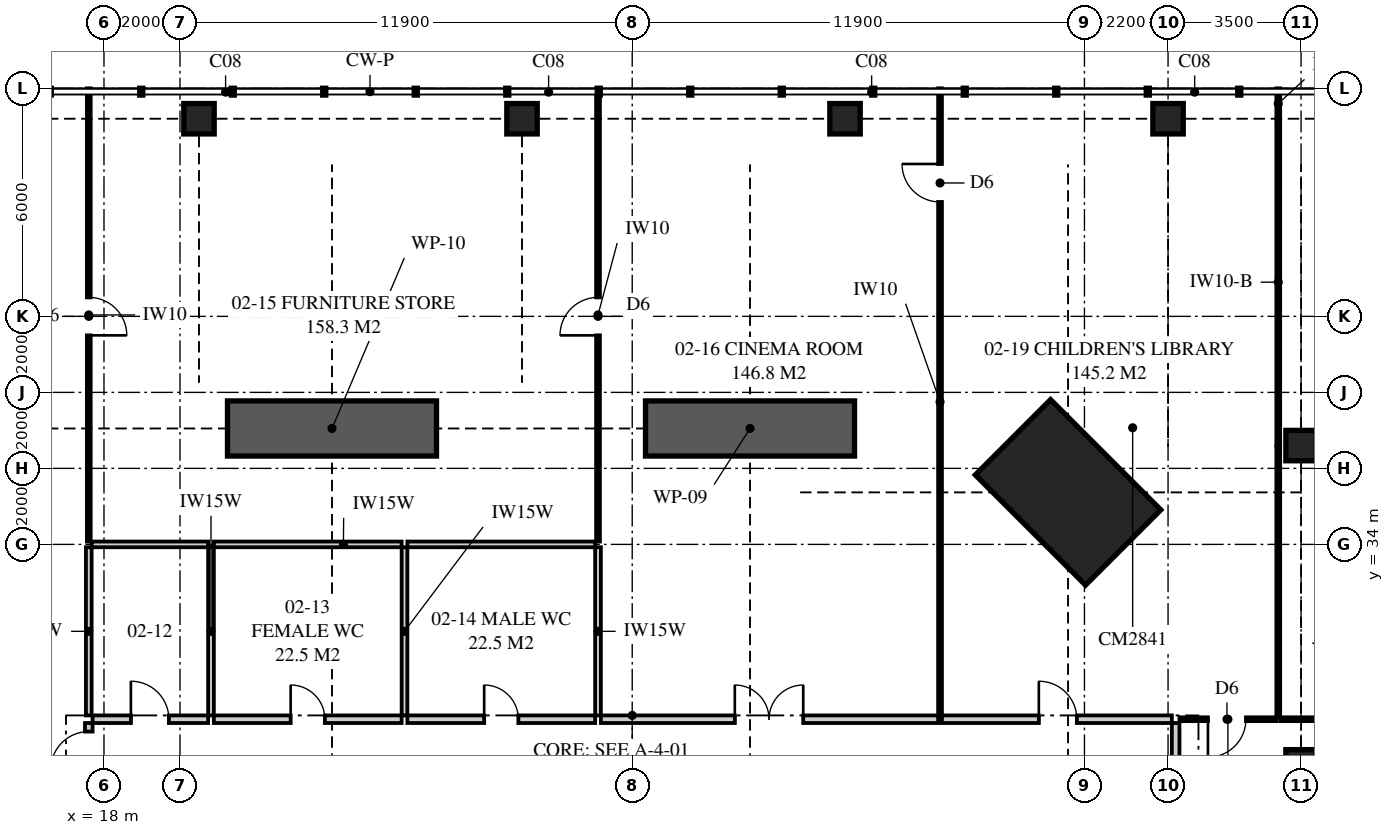
"""IFC4 building model, lengths in metres.
Left out: names, types, materials, properties, quantities, classifications, styles, units other than length and angle.
Written with IfcOpenShell. Run it as: python <this file> out.ifc"""

import sys

from ifc_helpers import new_model, si_unit, direction, frame, frame_2d, origin, origin_2d, place, context, subcontext, project, spatial, polyline, rectangle, outline, extrude, element, fill, save


model = new_model("IFC4")
c1 = context("Model", 3, precision=1e-05, world=origin(), true_north=direction((0.0, 1.0)))
c2 = subcontext(c1, "Body", "Model", "MODEL_VIEW")
j1 = project(units=[si_unit("LENGTHUNIT", "METRE"), si_unit("PLANEANGLEUNIT", "RADIAN")], contexts=[c1])
p1 = place(None, origin())
s1 = spatial("IfcSite", under=j1, at=p1, CompositionType="ELEMENT")
p2 = place(p1, origin())
s2 = spatial("IfcBuilding", under=s1, at=p2, CompositionType="ELEMENT")
p3 = place(p2, frame((0.0, 0.0, 11.0)))
s3 = spatial("IfcBuildingStorey", under=s2, at=p3, CompositionType="ELEMENT", Elevation=11.0)
p4 = place(p3, frame((43.369, 35.369, 0.0), z_axis=(0.0, 0.0, 1.0), x_axis=(-0.707106781187, -0.707106781187, 0.0)))
e1 = element("IfcColumn", 1, at=p4, inside=s3, PredefinedType="COLUMN", context=c2, shape_type="SweptSolid", body=[
    extrude(rectangle(XDim=2.8, YDim=4.1, at=origin_2d()), origin(), (0.0, 0.0, 1.0), 5.0),
])
for number, where, z_axis, x_axis in (
    (2, (49.5, 28.2, 0.0), (0.0, 0.0, 1.0), (1.0, 0.0, 0.0)),
    (3, (49.5, 36.6, 0.0), (0.0, 0.0, 1.0), (1.0, 0.0, 0.0)),
    (4, (20.5, 45.2, 0.0), (0.0, 0.0, 1.0), (1.0, 0.0, 0.0)),
    (5, (29.0, 45.2, 0.0), (0.0, 0.0, 1.0), (1.0, 0.0, 0.0)),
    (6, (37.5, 45.2, 0.0), (0.0, 0.0, 1.0), (1.0, 0.0, 0.0)),
    (7, (46.0, 45.2, 0.0), (0.0, 0.0, 1.0), (1.0, 0.0, 0.0)),
):
    element("IfcColumn", number, at=place(p3, frame(where, z_axis=z_axis, x_axis=x_axis)), inside=s3, PredefinedType="COLUMN", context=c2, shape_type="SweptSolid", body=[
        extrude(rectangle(XDim=0.8, YDim=0.8, at=origin_2d()), origin(), (0.0, 0.0, 1.0), 5.0),
    ])
p5 = place(p3, frame((17.6, 27.75, 0.0), z_axis=(0.0, 0.0, 1.0), x_axis=(0.0, 1.0, 0.0)))
e8 = element("IfcWall", 8, at=p5, inside=s3, PredefinedType="PARTITIONING", context=c2, shape_type="SweptSolid", body=[
    extrude(rectangle(XDim=1.55, YDim=0.2, at=frame_2d((0.775, 0.0))), origin(), (0.0, 0.0, 1.0), 4.72),
])
p6 = place(p5, frame((0.325, 0.0, 0.0)))
e9 = element("IfcOpeningElement", 9, at=p6, cuts=e8, PredefinedType="OPENING", context=c2, shape_type="SweptSolid", body=[
    extrude(rectangle(XDim=1.0, YDim=2.1, at=frame_2d((0.5, 1.05))), frame((0.0, 0.11, 0.0), z_axis=(0.0, -1.0, 0.0), x_axis=(1.0, 0.0, 0.0)), (0.0, 0.0, 1.0), 0.22),
])
p7 = place(p3, frame((17.6, 29.5, 0.0), z_axis=(0.0, 0.0, 1.0), x_axis=(0.0, 1.0, 0.0)))
e10 = element("IfcWall", 10, at=p7, inside=s3, PredefinedType="PLUMBINGWALL", context=c2, shape_type="SweptSolid", body=[
    extrude(rectangle(XDim=4.425, YDim=0.15, at=frame_2d((2.212, 0.0))), origin(), (0.0, 0.0, 1.0), 4.72),
])
p8 = place(p3, frame((17.6, 34.075, 0.0), z_axis=(0.0, 0.0, 1.0), x_axis=(0.0, 1.0, 0.0)))
e11 = element("IfcWall", 11, at=p8, inside=s3, PredefinedType="PARTITIONING", context=c2, shape_type="SweptSolid", body=[
    extrude(outline(polyline([(0.0, 0.0), (11.925, 0.0), (11.925, 4.72), (11.925, 4.02), (9.865, 4.02), (9.865, 4.72), (4.235, 4.72), (4.235, 4.02), (1.715, 4.02), (1.715, 4.72), (0.0, 4.72), (0.0, 0.0)])), frame((0.0, 0.05, 0.0), z_axis=(0.0, -1.0, 0.0), x_axis=(1.0, 0.0, 0.0)), (0.0, 0.0, 1.0), 0.1),
])
p9 = place(p8, frame((5.425, 0.0, 0.0)))
e12 = element("IfcOpeningElement", 12, at=p9, cuts=e11, PredefinedType="OPENING", context=c2, shape_type="SweptSolid", body=[
    extrude(rectangle(XDim=1.0, YDim=2.1, at=frame_2d((0.5, 1.05))), frame((0.0, 0.06, 0.0), z_axis=(0.0, -1.0, 0.0), x_axis=(1.0, 0.0, 0.0)), (0.0, 0.0, 1.0), 0.12),
])
p10 = place(p3, frame((17.7, 29.4, 0.0), z_axis=(0.0, 0.0, 1.0), x_axis=(1.0, 0.0, 0.0)))
e13 = element("IfcWall", 13, at=p10, inside=s3, PredefinedType="PARTITIONING", context=c2, shape_type="SweptSolid", body=[
    extrude(rectangle(XDim=3.041, YDim=0.2, at=frame_2d((1.521, 0.0))), origin(), (0.0, 0.0, 1.0), 4.72),
])
p11 = place(p10, frame((1.008, 0.0, 0.0)))
e14 = element("IfcOpeningElement", 14, at=p11, cuts=e13, PredefinedType="OPENING", context=c2, shape_type="SweptSolid", body=[
    extrude(rectangle(XDim=1.0, YDim=2.1, at=frame_2d((0.5, 1.05))), frame((0.0, 0.11, 0.0), z_axis=(0.0, -1.0, 0.0), x_axis=(1.0, 0.0, 0.0)), (0.0, 0.0, 1.0), 0.22),
])
p12 = place(p3, frame((20.891, 29.4, 0.0), z_axis=(0.0, 0.0, 1.0), x_axis=(1.0, 0.0, 0.0)))
e15 = element("IfcWall", 15, at=p12, inside=s3, PredefinedType="PARTITIONING", context=c2, shape_type="SweptSolid", body=[
    extrude(outline(polyline([(0.0, 0.0), (4.942, 0.0), (4.942, 4.72), (4.419, 4.72), (4.419, 4.02), (1.799, 4.02), (1.799, 4.72), (0.0, 4.72), (0.0, 0.0)])), frame((0.0, 0.1, 0.0), z_axis=(0.0, -1.0, 0.0), x_axis=(1.0, 0.0, 0.0)), (0.0, 0.0, 1.0), 0.2),
])
p13 = place(p12, frame((2.021, 0.0, 0.0)))
e16 = element("IfcOpeningElement", 16, at=p13, cuts=e15, PredefinedType="OPENING", context=c2, shape_type="SweptSolid", body=[
    extrude(rectangle(XDim=0.9, YDim=2.1, at=frame_2d((0.45, 1.05))), frame((0.0, 0.11, 0.0), z_axis=(0.0, -1.0, 0.0), x_axis=(1.0, 0.0, 0.0)), (0.0, 0.0, 1.0), 0.22),
])
p14 = place(p3, frame((25.983, 29.4, 0.0), z_axis=(0.0, 0.0, 1.0), x_axis=(1.0, 0.0, 0.0)))
e17 = element("IfcWall", 17, at=p14, inside=s3, PredefinedType="PARTITIONING", context=c2, shape_type="SweptSolid", body=[
    extrude(rectangle(XDim=4.942, YDim=0.2, at=frame_2d((2.471, 0.0))), origin(), (0.0, 0.0, 1.0), 4.72),
])
p15 = place(p14, frame((2.021, 0.0, 0.0)))
e18 = element("IfcOpeningElement", 18, at=p15, cuts=e17, PredefinedType="OPENING", context=c2, shape_type="SweptSolid", body=[
    extrude(rectangle(XDim=0.9, YDim=2.1, at=frame_2d((0.45, 1.05))), frame((0.0, 0.11, 0.0), z_axis=(0.0, -1.0, 0.0), x_axis=(1.0, 0.0, 0.0)), (0.0, 0.0, 1.0), 0.22),
])
p16 = place(p3, frame((31.075, 29.4, 0.0), z_axis=(0.0, 0.0, 1.0), x_axis=(1.0, 0.0, 0.0)))
e19 = element("IfcWall", 19, at=p16, inside=s3, PredefinedType="PARTITIONING", context=c2, shape_type="SweptSolid", body=[
    extrude(outline(polyline([(0.0, 0.0), (8.875, 0.0), (8.875, 4.72), (5.235, 4.72), (5.235, 4.02), (2.615, 4.02), (2.615, 4.72), (0.0, 4.72), (0.0, 0.0)])), frame((0.0, 0.1, 0.0), z_axis=(0.0, -1.0, 0.0), x_axis=(1.0, 0.0, 0.0)), (0.0, 0.0, 1.0), 0.2),
])
p17 = place(p16, frame((3.525, 0.0, 0.0)))
e20 = element("IfcOpeningElement", 20, at=p17, cuts=e19, PredefinedType="OPENING", context=c2, shape_type="SweptSolid", body=[
    extrude(rectangle(XDim=1.8, YDim=2.1, at=frame_2d((0.9, 1.05))), frame((0.0, 0.11, 0.0), z_axis=(0.0, -1.0, 0.0), x_axis=(1.0, 0.0, 0.0)), (0.0, 0.0, 1.0), 0.22),
])
p18 = place(p3, frame((46.2, 27.75, 0.0), z_axis=(0.0, 0.0, 1.0), x_axis=(0.0, 1.0, 0.0)))
e21 = element("IfcWall", 21, at=p18, inside=s3, PredefinedType="PARTITIONING", context=c2, shape_type="SweptSolid", body=[
    extrude(outline(polyline([(0.0, 0.0), (1.55, 0.0), (1.55, 4.72), (1.55, 4.02), (0.0, 4.02), (0.0, 4.72), (0.0, 0.0)])), frame((0.0, 0.1, 0.0), z_axis=(0.0, -1.0, 0.0), x_axis=(1.0, 0.0, 0.0)), (0.0, 0.0, 1.0), 0.2),
])
p19 = place(p3, frame((40.05, 29.4, 0.0), z_axis=(0.0, 0.0, 1.0), x_axis=(1.0, 0.0, 0.0)))
e22 = element("IfcWall", 22, at=p19, inside=s3, PredefinedType="PARTITIONING", context=c2, shape_type="SweptSolid", body=[
    extrude(outline(polyline([(0.0, 0.0), (2.55, 0.0), (2.55, 4.02), (2.009, 4.02), (2.009, 4.72), (0.0, 4.72), (0.0, 0.0)])), frame((0.0, 0.1, 0.0), z_axis=(0.0, -1.0, 0.0), x_axis=(1.0, 0.0, 0.0)), (0.0, 0.0, 1.0), 0.2),
])
p20 = place(p3, frame((42.6, 29.4, 0.0), z_axis=(0.0, 0.0, 1.0), x_axis=(1.0, 0.0, 0.0)))
e23 = element("IfcWall", 23, at=p20, inside=s3, PredefinedType="PARTITIONING", context=c2, shape_type="SweptSolid", body=[
    extrude(rectangle(XDim=3.5, YDim=0.2, at=frame_2d((1.75, 0.0))), origin(), (0.0, 0.0, 1.0), 4.02),
])
p21 = place(p20, origin())
e24 = element("IfcOpeningElement", 24, at=p21, cuts=e23, PredefinedType="OPENING", context=c2, shape_type="SweptSolid", body=[
    extrude(rectangle(XDim=1.0, YDim=2.1, at=frame_2d((0.5, 1.05))), frame((0.0, 0.11, 0.0), z_axis=(0.0, -1.0, 0.0), x_axis=(1.0, 0.0, 0.0)), (0.0, 0.0, 1.0), 0.22),
])
p22 = place(p3, frame((20.816, 29.5, 0.0), z_axis=(0.0, 0.0, 1.0), x_axis=(0.0, 1.0, 0.0)))
e25 = element("IfcWall", 25, at=p22, inside=s3, PredefinedType="PLUMBINGWALL", context=c2, shape_type="SweptSolid", body=[
    extrude(rectangle(XDim=4.425, YDim=0.15, at=frame_2d((2.212, 0.0))), origin(), (0.0, 0.0, 1.0), 4.72),
])
p23 = place(p3, frame((17.675, 34.0, 0.0), z_axis=(0.0, 0.0, 1.0), x_axis=(1.0, 0.0, 0.0)))
e26 = element("IfcWall", 26, at=p23, inside=s3, PredefinedType="PLUMBINGWALL", context=c2, shape_type="SweptSolid", body=[
    extrude(rectangle(XDim=3.066, YDim=0.15, at=frame_2d((1.533, 0.0))), origin(), (0.0, 0.0, 1.0), 4.72),
])
p24 = place(p3, frame((25.908, 29.5, 0.0), z_axis=(0.0, 0.0, 1.0), x_axis=(0.0, 1.0, 0.0)))
e27 = element("IfcWall", 27, at=p24, inside=s3, PredefinedType="PLUMBINGWALL", context=c2, shape_type="SweptSolid", body=[
    extrude(rectangle(XDim=4.425, YDim=0.15, at=frame_2d((2.212, 0.0))), origin(), (0.0, 0.0, 1.0), 4.72),
])
p25 = place(p3, frame((20.891, 34.0, 0.0), z_axis=(0.0, 0.0, 1.0), x_axis=(1.0, 0.0, 0.0)))
e28 = element("IfcWall", 28, at=p25, inside=s3, PredefinedType="PLUMBINGWALL", context=c2, shape_type="SweptSolid", body=[
    extrude(outline(polyline([(0.0, 0.0), (4.942, 0.0), (4.942, 4.72), (4.394, 4.72), (4.394, 4.02), (1.824, 4.02), (1.824, 4.72), (0.0, 4.72), (0.0, 0.0)])), frame((0.0, 0.075, 0.0), z_axis=(0.0, -1.0, 0.0), x_axis=(1.0, 0.0, 0.0)), (0.0, 0.0, 1.0), 0.15),
])
p26 = place(p3, frame((25.983, 34.0, 0.0), z_axis=(0.0, 0.0, 1.0), x_axis=(1.0, 0.0, 0.0)))
e29 = element("IfcWall", 29, at=p26, inside=s3, PredefinedType="PLUMBINGWALL", context=c2, shape_type="SweptSolid", body=[
    extrude(rectangle(XDim=4.942, YDim=0.15, at=frame_2d((2.471, 0.0))), origin(), (0.0, 0.0, 1.0), 4.72),
])
p27 = place(p3, frame((31.0, 29.5, 0.0), z_axis=(0.0, 0.0, 1.0), x_axis=(0.0, 1.0, 0.0)))
e30 = element("IfcWall", 30, at=p27, inside=s3, PredefinedType="PLUMBINGWALL", context=c2, shape_type="SweptSolid", body=[
    extrude(rectangle(XDim=4.425, YDim=0.15, at=frame_2d((2.212, 0.0))), origin(), (0.0, 0.0, 1.0), 4.72),
])
p28 = place(p3, frame((31.0, 34.075, 0.0), z_axis=(0.0, 0.0, 1.0), x_axis=(0.0, 1.0, 0.0)))
e31 = element("IfcWall", 31, at=p28, inside=s3, PredefinedType="PARTITIONING", context=c2, shape_type="SweptSolid", body=[
    extrude(outline(polyline([(0.0, 0.0), (11.925, 0.0), (11.925, 4.72), (11.925, 4.02), (9.865, 4.02), (9.865, 4.72), (4.235, 4.72), (4.235, 4.02), (1.715, 4.02), (1.715, 4.72), (0.0, 4.72), (0.0, 0.0)])), frame((0.0, 0.05, 0.0), z_axis=(0.0, -1.0, 0.0), x_axis=(1.0, 0.0, 0.0)), (0.0, 0.0, 1.0), 0.1),
])
p29 = place(p28, frame((5.425, 0.0, 0.0)))
e32 = element("IfcOpeningElement", 32, at=p29, cuts=e31, PredefinedType="OPENING", context=c2, shape_type="SweptSolid", body=[
    extrude(rectangle(XDim=1.0, YDim=2.1, at=frame_2d((0.5, 1.05))), frame((0.0, 0.06, 0.0), z_axis=(0.0, -1.0, 0.0), x_axis=(1.0, 0.0, 0.0)), (0.0, 0.0, 1.0), 0.12),
])
p30 = place(p3, frame((40.0, 29.5, 0.0), z_axis=(0.0, 0.0, 1.0), x_axis=(0.0, 1.0, 0.0)))
e33 = element("IfcWall", 33, at=p30, inside=s3, PredefinedType="PARTITIONING", context=c2, shape_type="SweptSolid", body=[
    extrude(outline(polyline([(0.0, 0.0), (16.5, 0.0), (16.5, 4.72), (16.5, 4.02), (14.44, 4.02), (14.44, 4.72), (7.129, 4.72), (7.129, 4.02), (4.609, 4.02), (4.609, 4.72), (0.0, 4.72), (0.0, 0.0)])), frame((0.0, 0.05, 0.0), z_axis=(0.0, -1.0, 0.0), x_axis=(1.0, 0.0, 0.0)), (0.0, 0.0, 1.0), 0.1),
])
p31 = place(p30, frame((13.51, 0.0, 0.0)))
e34 = element("IfcOpeningElement", 34, at=p31, cuts=e33, PredefinedType="OPENING", context=c2, shape_type="SweptSolid", body=[
    extrude(rectangle(XDim=1.0, YDim=2.1, at=frame_2d((0.5, 1.05))), frame((0.0, 0.06, 0.0), z_axis=(0.0, -1.0, 0.0), x_axis=(1.0, 0.0, 0.0)), (0.0, 0.0, 1.0), 0.12),
])
p32 = place(p3, frame((48.95, 29.4, 0.0), z_axis=(0.0, 0.0, 1.0), x_axis=(1.0, 0.0, 0.0)))
e35 = element("IfcWall", 35, at=p32, inside=s3, PredefinedType="PARTITIONING", context=c2, shape_type="SweptSolid", body=[
    extrude(outline(polyline([(0.0, 0.0), (10.25, 0.0), (10.25, 3.52), (9.95, 3.52), (9.95, 4.02), (0.91, 4.02), (0.91, 3.52), (0.25, 3.52), (0.25, 4.02), (0.0, 4.02), (0.0, 0.0)])), frame((0.0, 0.05, 0.0), z_axis=(0.0, -1.0, 0.0), x_axis=(1.0, 0.0, 0.0)), (0.0, 0.0, 1.0), 0.1),
])
p33 = place(p32, frame((1.67, 0.0, 0.0)))
e36 = element("IfcOpeningElement", 36, at=p33, cuts=e35, PredefinedType="OPENING", context=c2, shape_type="SweptSolid", body=[
    extrude(rectangle(XDim=1.0, YDim=2.1, at=frame_2d((0.5, 1.05))), frame((0.0, 0.06, 0.0), z_axis=(0.0, -1.0, 0.0), x_axis=(1.0, 0.0, 0.0)), (0.0, 0.0, 1.0), 0.12),
])
p34 = place(p32, frame((8.33, 0.0, 0.0)))
e37 = element("IfcOpeningElement", 37, at=p34, cuts=e35, PredefinedType="OPENING", context=c2, shape_type="SweptSolid", body=[
    extrude(rectangle(XDim=1.0, YDim=2.1, at=frame_2d((0.5, 1.05))), frame((0.0, 0.06, 0.0), z_axis=(0.0, -1.0, 0.0), x_axis=(1.0, 0.0, 0.0)), (0.0, 0.0, 1.0), 0.12),
])
p35 = place(p3, frame((48.9, 29.45, 0.0), z_axis=(0.0, 0.0, 1.0), x_axis=(0.0, 1.0, 0.0)))
e38 = element("IfcWall", 38, at=p35, inside=s3, PredefinedType="PARTITIONING", context=c2, shape_type="SweptSolid", body=[
    extrude(outline(polyline([(0.0, 0.0), (7.15, 0.0), (7.15, 4.02), (4.659, 4.02), (4.659, 4.72), (0.01, 4.72), (0.01, 4.02), (0.0, 4.02), (0.0, 0.0)])), frame((0.0, 0.05, 0.0), z_axis=(0.0, -1.0, 0.0), x_axis=(1.0, 0.0, 0.0)), (0.0, 0.0, 1.0), 0.1),
])
p36 = place(p3, frame((48.9, 36.6, 0.0), z_axis=(0.0, 0.0, 1.0), x_axis=(0.0, 1.0, 0.0)))
e39 = element("IfcWall", 39, at=p36, inside=s3, PredefinedType="PARTITIONING", context=c2, shape_type="SweptSolid", body=[
    extrude(rectangle(XDim=8.6, YDim=0.1, at=frame_2d((4.3, 0.0))), origin(), (0.0, 0.0, 1.0), 4.02),
])
p37 = place(p3, frame((48.9, 45.2, 0.0), z_axis=(0.0, 0.0, 1.0), x_axis=(0.0, 1.0, 0.0)))
e40 = element("IfcWall", 40, at=p37, inside=s3, PredefinedType="PARTITIONING", context=c2, shape_type="SweptSolid", body=[
    extrude(rectangle(XDim=0.8, YDim=0.1, at=frame_2d((0.4, 0.0))), origin(), (0.0, 0.0, 1.0), 4.02),
])
p38 = place(p3, frame((46.3, 29.4, 0.0), z_axis=(0.0, 0.0, 1.0), x_axis=(1.0, 0.0, 0.0)))
e41 = element("IfcWall", 41, at=p38, inside=s3, PredefinedType="PARTITIONING", context=c2, shape_type="SweptSolid", body=[
    extrude(outline(polyline([(0.0, 0.0), (2.55, 0.0), (2.55, 4.72), (2.55, 4.02), (0.0, 4.02), (0.0, 4.72), (0.0, 0.0)])), frame((0.0, 0.05, 0.0), z_axis=(0.0, -1.0, 0.0), x_axis=(1.0, 0.0, 0.0)), (0.0, 0.0, 1.0), 0.1),
])
p39 = place(p38, frame((0.75, 0.0, 0.0)))
e42 = element("IfcOpeningElement", 42, at=p39, cuts=e41, PredefinedType="OPENING", context=c2, shape_type="SweptSolid", body=[
    extrude(rectangle(XDim=1.0, YDim=2.1, at=frame_2d((0.5, 1.05))), frame((0.0, 0.06, 0.0), z_axis=(0.0, -1.0, 0.0), x_axis=(1.0, 0.0, 0.0)), (0.0, 0.0, 1.0), 0.12),
])
for number, where, z_axis, x_axis in (
    (43, (32.25, 37.05, 0.0), (0.0, 0.0, 1.0), (1.0, 0.0, 0.0)),
    (44, (21.25, 37.05, 0.0), (0.0, 0.0, 1.0), (1.0, 0.0, 0.0)),
):
    element("IfcWall", number, at=place(p3, frame(where, z_axis=z_axis, x_axis=x_axis)), inside=s3, PredefinedType="SHEAR", context=c2, shape_type="SweptSolid", body=[
        extrude(rectangle(XDim=5.5, YDim=1.45, at=frame_2d((2.75, 0.0))), origin(), (0.0, 0.0, 1.0), 5.0),
    ])
p40 = place(p6, origin())
e45 = element("IfcDoor", 45, at=p40, inside=s3, OperationType="SINGLE_SWING_LEFT", PredefinedType="DOOR", context=c2, shape_type="SweptSolid", body=[
    extrude(rectangle(XDim=1.0, YDim=2.1, at=frame_2d((0.5, 1.05))), frame((0.0, 0.025, 0.0), z_axis=(0.0, -1.0, 0.0), x_axis=(1.0, 0.0, 0.0)), (0.0, 0.0, 1.0), 0.05),
])
fill(e9, e45)
p41 = place(p21, origin())
e46 = element("IfcDoor", 46, at=p41, inside=s3, OperationType="SINGLE_SWING_LEFT", PredefinedType="DOOR", context=c2, shape_type="SweptSolid", body=[
    extrude(rectangle(XDim=1.0, YDim=2.1, at=frame_2d((0.5, 1.05))), frame((0.0, 0.025, 0.0), z_axis=(0.0, -1.0, 0.0), x_axis=(1.0, 0.0, 0.0)), (0.0, 0.0, 1.0), 0.05),
])
fill(e24, e46)
p42 = place(p11, origin())
e47 = element("IfcDoor", 47, at=p42, inside=s3, OperationType="SINGLE_SWING_LEFT", PredefinedType="DOOR", context=c2, shape_type="SweptSolid", body=[
    extrude(rectangle(XDim=1.0, YDim=2.1, at=frame_2d((0.5, 1.05))), frame((0.0, 0.025, 0.0), z_axis=(0.0, -1.0, 0.0), x_axis=(1.0, 0.0, 0.0)), (0.0, 0.0, 1.0), 0.05),
])
fill(e14, e47)
p43 = place(p13, origin())
e48 = element("IfcDoor", 48, at=p43, inside=s3, OperationType="SINGLE_SWING_LEFT", PredefinedType="DOOR", context=c2, shape_type="SweptSolid", body=[
    extrude(rectangle(XDim=0.9, YDim=2.1, at=frame_2d((0.45, 1.05))), frame((0.0, 0.025, 0.0), z_axis=(0.0, -1.0, 0.0), x_axis=(1.0, 0.0, 0.0)), (0.0, 0.0, 1.0), 0.05),
])
fill(e16, e48)
p44 = place(p15, origin())
e49 = element("IfcDoor", 49, at=p44, inside=s3, OperationType="SINGLE_SWING_LEFT", PredefinedType="DOOR", context=c2, shape_type="SweptSolid", body=[
    extrude(rectangle(XDim=0.9, YDim=2.1, at=frame_2d((0.45, 1.05))), frame((0.0, 0.025, 0.0), z_axis=(0.0, -1.0, 0.0), x_axis=(1.0, 0.0, 0.0)), (0.0, 0.0, 1.0), 0.05),
])
fill(e18, e49)
p45 = place(p29, origin())
e50 = element("IfcDoor", 50, at=p45, inside=s3, OperationType="SINGLE_SWING_LEFT", PredefinedType="DOOR", context=c2, shape_type="SweptSolid", body=[
    extrude(rectangle(XDim=1.0, YDim=2.1, at=frame_2d((0.5, 1.05))), frame((0.0, 0.025, 0.0), z_axis=(0.0, -1.0, 0.0), x_axis=(1.0, 0.0, 0.0)), (0.0, 0.0, 1.0), 0.05),
])
fill(e32, e50)
p46 = place(p9, frame((1.0, 0.0, 0.0), z_axis=(0.0, 0.0, 1.0), x_axis=(-1.0, 0.0, 0.0)))
e51 = element("IfcDoor", 51, at=p46, inside=s3, OperationType="SINGLE_SWING_RIGHT", PredefinedType="DOOR", context=c2, shape_type="SweptSolid", body=[
    extrude(rectangle(XDim=1.0, YDim=2.1, at=frame_2d((0.5, 1.05))), frame((0.0, 0.025, 0.0), z_axis=(0.0, -1.0, 0.0), x_axis=(1.0, 0.0, 0.0)), (0.0, 0.0, 1.0), 0.05),
])
fill(e12, e51)
p47 = place(p17, origin())
e52 = element("IfcDoor", 52, at=p47, inside=s3, OperationType="DOUBLE_DOOR_SINGLE_SWING", PredefinedType="DOOR", context=c2, shape_type="SweptSolid", body=[
    extrude(rectangle(XDim=1.8, YDim=2.1, at=frame_2d((0.9, 1.05))), frame((0.0, 0.025, 0.0), z_axis=(0.0, -1.0, 0.0), x_axis=(1.0, 0.0, 0.0)), (0.0, 0.0, 1.0), 0.05),
])
fill(e20, e52)
p48 = place(p39, frame((1.0, 0.0, 0.0), z_axis=(0.0, 0.0, 1.0), x_axis=(-1.0, 0.0, 0.0)))
e53 = element("IfcDoor", 53, at=p48, inside=s3, OperationType="SINGLE_SWING_RIGHT", PredefinedType="DOOR", context=c2, shape_type="SweptSolid", body=[
    extrude(rectangle(XDim=1.0, YDim=2.1, at=frame_2d((0.5, 1.05))), frame((0.0, 0.025, 0.0), z_axis=(0.0, -1.0, 0.0), x_axis=(1.0, 0.0, 0.0)), (0.0, 0.0, 1.0), 0.05),
])
fill(e42, e53)
p49 = place(p31, origin())
e54 = element("IfcDoor", 54, at=p49, inside=s3, OperationType="SINGLE_SWING_RIGHT", PredefinedType="DOOR", context=c2, shape_type="SweptSolid", body=[
    extrude(rectangle(XDim=1.0, YDim=2.1, at=frame_2d((0.5, 1.05))), frame((0.0, 0.025, 0.0), z_axis=(0.0, -1.0, 0.0), x_axis=(1.0, 0.0, 0.0)), (0.0, 0.0, 1.0), 0.05),
])
fill(e34, e54)
save(model, sys.argv[1])
